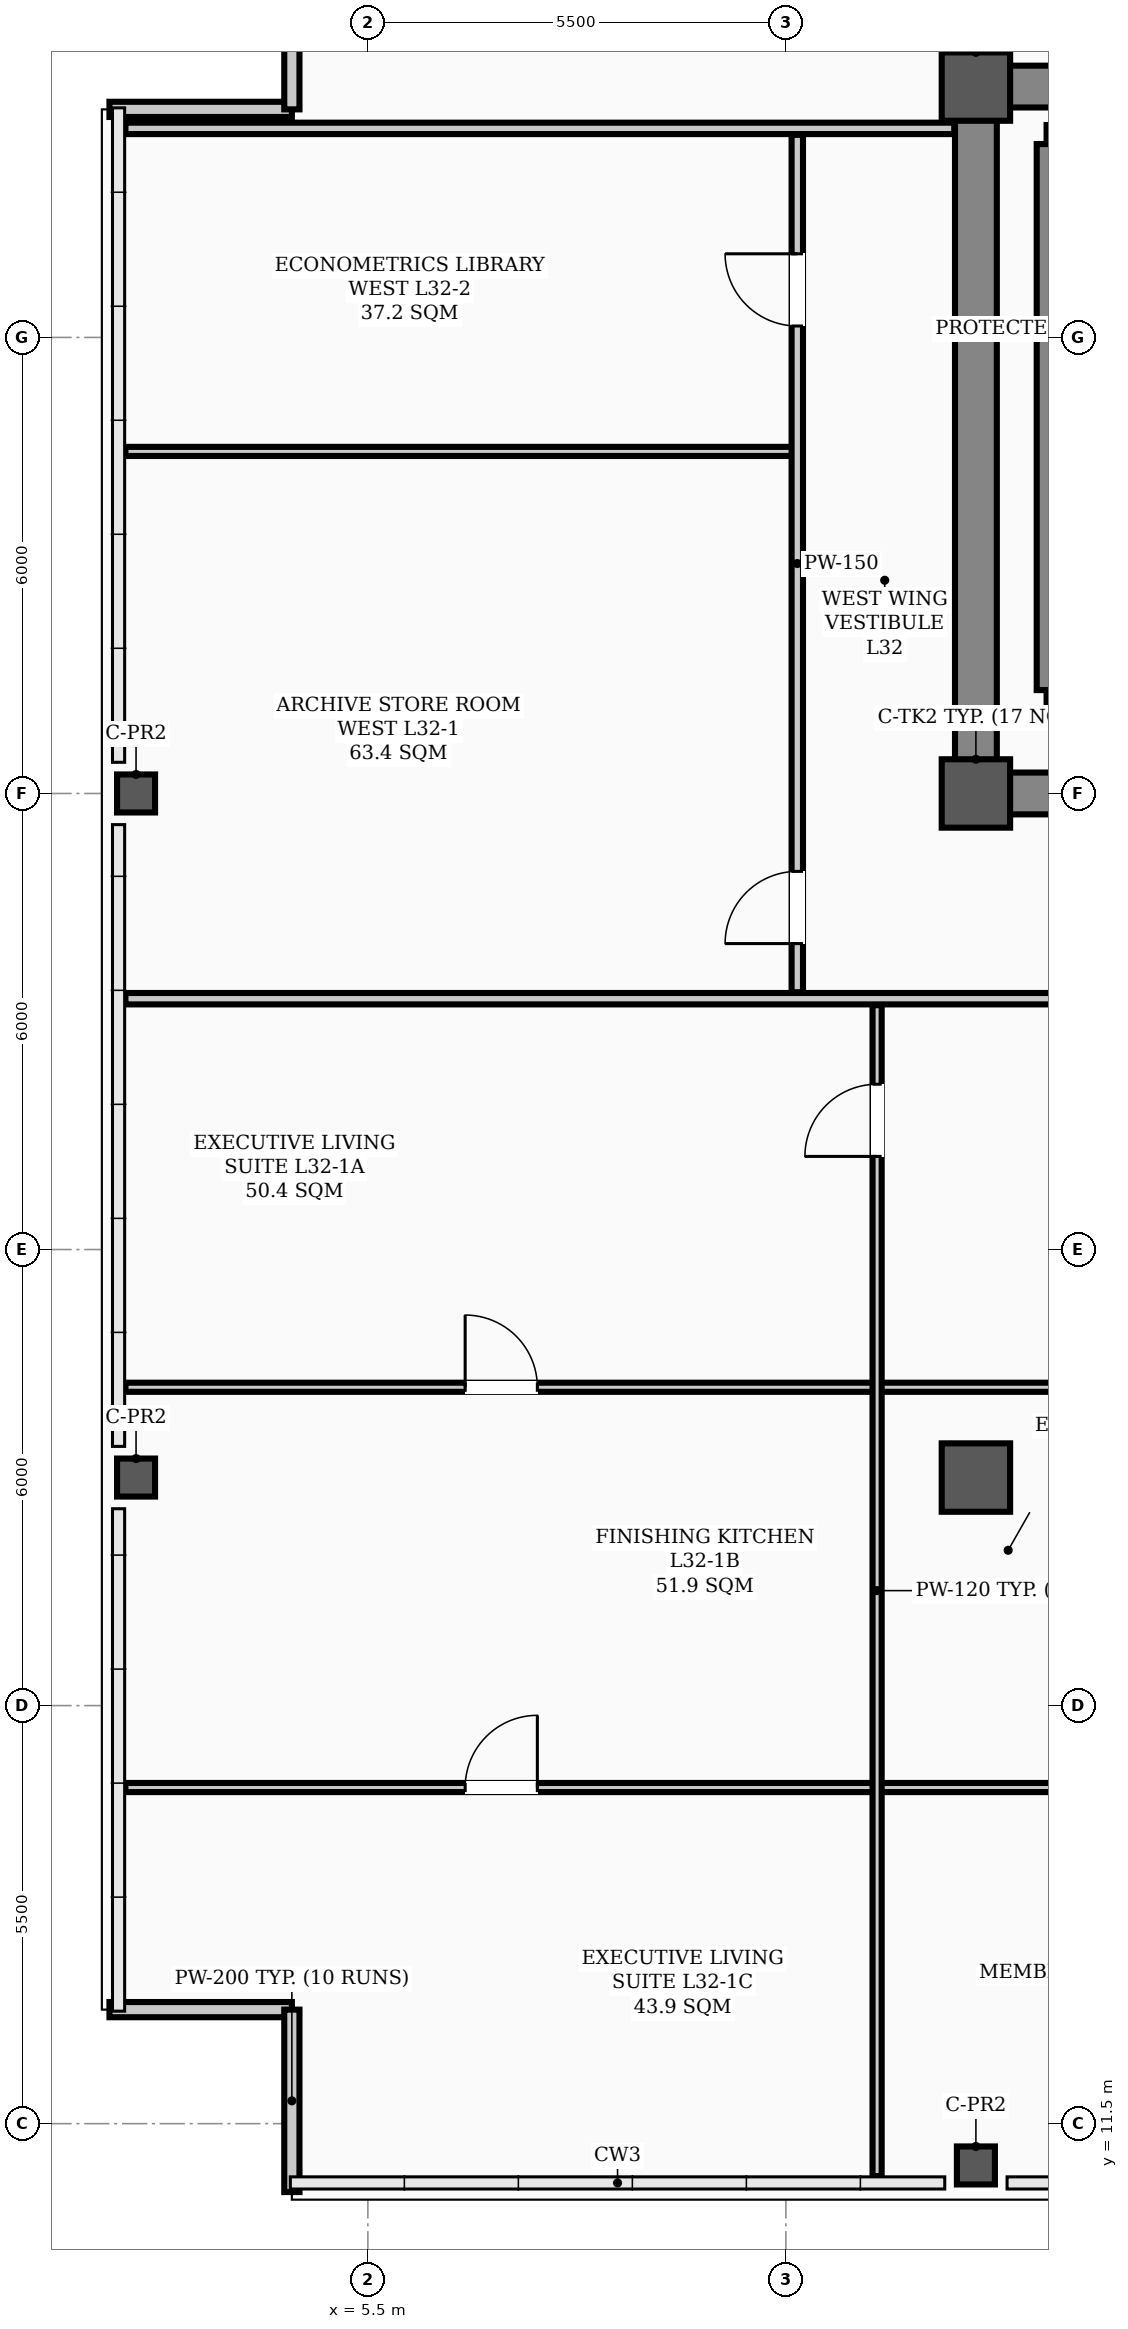
"""IFC4 building model, lengths in metres.
Left out: names, types, materials, properties, quantities, classifications, styles, units other than length and angle.
Written with IfcOpenShell. Run it as: python <this file> out.ifc"""

import sys

from ifc_helpers import new_model, si_unit, direction, frame, frame_2d, origin, origin_2d, place, context, subcontext, project, spatial, rectangle, hollow_rectangle, extrude, element, fill, save


model = new_model("IFC4")
c1 = context("Model", 3, precision=1e-05, world=origin(), true_north=direction((0.0, 1.0)))
c2 = subcontext(c1, "Body", "Model", "MODEL_VIEW")
j1 = project(units=[si_unit("LENGTHUNIT", "METRE"), si_unit("PLANEANGLEUNIT", "RADIAN")], contexts=[c1])
p1 = place(None, origin())
s1 = spatial("IfcSite", under=j1, at=p1, CompositionType="ELEMENT")
p2 = place(p1, origin())
s2 = spatial("IfcBuilding", under=s1, at=p2, CompositionType="ELEMENT")
p3 = place(p2, frame((0.0, 0.0, 130.5)))
s3 = spatial("IfcBuildingStorey", under=s2, at=p3, CompositionType="ELEMENT", Elevation=130.5)
for number, where, z_axis, x_axis in (
    (1, (13.5, 29.0, 0.0), (0.0, 0.0, 1.0), (1.0, 0.0, 0.0)),
    (2, (13.5, 38.3, 0.0), (0.0, 0.0, 1.0), (1.0, 0.0, 0.0)),
    (3, (13.5, 20.0, 0.0), (0.0, 0.0, 1.0), (1.0, 0.0, 0.0)),
):
    element("IfcColumn", number, at=place(p3, frame(where, z_axis=z_axis, x_axis=x_axis)), inside=s3, PredefinedType="COLUMN", context=c2, shape_type="SweptSolid", body=[
        extrude(hollow_rectangle(XDim=0.9, YDim=0.9, WallThickness=0.035, InnerFilletRadius=0.017, OuterFilletRadius=0.052, at=origin_2d()), origin(), (0.0, 0.0, 1.0), 3.9),
    ])
for number, where, z_axis, x_axis in (
    (4, (2.45, 20.0, 0.0), (0.0, 0.0, 1.0), (1.0, 0.0, 0.0)),
    (5, (2.45, 29.0, 0.0), (0.0, 0.0, 1.0), (1.0, 0.0, 0.0)),
    (6, (13.5, 10.95, 0.0), (0.0, 0.0, 1.0), (1.0, 0.0, 0.0)),
):
    element("IfcColumn", number, at=place(p3, frame(where, z_axis=z_axis, x_axis=x_axis)), inside=s3, PredefinedType="COLUMN", context=c2, shape_type="SweptSolid", body=[
        extrude(hollow_rectangle(XDim=0.5, YDim=0.5, WallThickness=0.024, InnerFilletRadius=0.012, OuterFilletRadius=0.036, at=origin_2d()), origin(), (0.0, 0.0, 1.0), 3.9),
    ])
for number, where, z_axis, x_axis in (
    (7, (2.1, 13.0, 0.0), (0.0, 0.0, 1.0), (1.0, 0.0, 0.0)),
    (8, (4.5, 13.0, 0.0), (0.0, 0.0, 1.0), (0.0, -1.0, 0.0)),
    (9, (2.1, 38.0, 0.0), (0.0, 0.0, 1.0), (1.0, 0.0, 0.0)),
    (10, (4.5, 38.0, 0.0), (0.0, 0.0, 1.0), (0.0, 1.0, 0.0)),
):
    element("IfcWall", number, at=place(p3, frame(where, z_axis=z_axis, x_axis=x_axis)), inside=s3, PredefinedType="PARAPET", context=c2, shape_type="SweptSolid", body=[
        extrude(rectangle(XDim=2.4, YDim=0.2, at=frame_2d((1.2, 0.0))), origin(), (0.0, 0.0, 1.0), 1.2),
    ])
p4 = place(p3, frame((13.5, 29.0, 0.0), z_axis=(0.0, 0.0, 1.0), x_axis=(1.0, 0.0, 0.0)))
e11 = element("IfcWall", 11, at=p4, inside=s3, PredefinedType="SHEAR", context=c2, shape_type="SweptSolid", body=[
    extrude(rectangle(XDim=30.5, YDim=0.55, at=frame_2d((15.25, 0.0))), origin(), (0.0, 0.0, 1.0), 3.72),
])
p5 = place(p4, frame((1.75, 0.0, 0.0)))
e12 = element("IfcOpeningElement", 12, at=p5, cuts=e11, PredefinedType="OPENING", context=c2, shape_type="SweptSolid", body=[
    extrude(rectangle(XDim=1.1, YDim=2.08, at=frame_2d((0.55, 1.04))), frame((0.0, 0.285, 0.0), z_axis=(0.0, -1.0, 0.0), x_axis=(1.0, 0.0, 0.0)), (0.0, 0.0, 1.0), 0.57),
])
p6 = place(p4, frame((26.7, 0.0, 0.0)))
e13 = element("IfcOpeningElement", 13, at=p6, cuts=e11, PredefinedType="OPENING", context=c2, shape_type="SweptSolid", body=[
    extrude(rectangle(XDim=1.1, YDim=2.08, at=frame_2d((0.55, 1.04))), frame((0.0, 0.285, 0.0), z_axis=(0.0, -1.0, 0.0), x_axis=(1.0, 0.0, 0.0)), (0.0, 0.0, 1.0), 0.57),
])
p7 = place(p4, frame((6.8, 0.0, 0.0)))
e14 = element("IfcOpeningElement", 14, at=p7, cuts=e11, PredefinedType="OPENING", context=c2, shape_type="SweptSolid", body=[
    extrude(rectangle(XDim=1.1, YDim=2.08, at=frame_2d((0.55, 1.04))), frame((0.0, 0.285, 0.0), z_axis=(0.0, -1.0, 0.0), x_axis=(1.0, 0.0, 0.0)), (0.0, 0.0, 1.0), 0.57),
])
p8 = place(p4, frame((13.2, 0.0, 0.0)))
e15 = element("IfcOpeningElement", 15, at=p8, cuts=e11, PredefinedType="OPENING", context=c2, shape_type="SweptSolid", body=[
    extrude(rectangle(XDim=1.6, YDim=2.08, at=frame_2d((0.8, 1.04))), frame((0.0, 0.285, 0.0), z_axis=(0.0, -1.0, 0.0), x_axis=(1.0, 0.0, 0.0)), (0.0, 0.0, 1.0), 0.57),
])
p9 = place(p4, frame((19.53, 0.0, 0.0)))
e16 = element("IfcOpeningElement", 16, at=p9, cuts=e11, PredefinedType="OPENING", context=c2, shape_type="SweptSolid", body=[
    extrude(rectangle(XDim=0.9, YDim=2.08, at=frame_2d((0.45, 1.04))), frame((0.0, 0.285, 0.0), z_axis=(0.0, -1.0, 0.0), x_axis=(1.0, 0.0, 0.0)), (0.0, 0.0, 1.0), 0.57),
])
p10 = place(p4, frame((21.57, 0.0, 0.0)))
e17 = element("IfcOpeningElement", 17, at=p10, cuts=e11, PredefinedType="OPENING", context=c2, shape_type="SweptSolid", body=[
    extrude(rectangle(XDim=0.9, YDim=2.08, at=frame_2d((0.45, 1.04))), frame((0.0, 0.285, 0.0), z_axis=(0.0, -1.0, 0.0), x_axis=(1.0, 0.0, 0.0)), (0.0, 0.0, 1.0), 0.57),
])
p11 = place(p3, frame((13.5, 38.3, 0.0), z_axis=(0.0, 0.0, 1.0), x_axis=(1.0, 0.0, 0.0)))
e18 = element("IfcWall", 18, at=p11, inside=s3, PredefinedType="SHEAR", context=c2, shape_type="SweptSolid", body=[
    extrude(rectangle(XDim=30.5, YDim=0.55, at=frame_2d((15.25, 0.0))), origin(), (0.0, 0.0, 1.0), 3.72),
])
p12 = place(p3, frame((13.5, 29.35, 0.0), z_axis=(0.0, 0.0, 1.0), x_axis=(0.0, 1.0, 0.0)))
e19 = element("IfcWall", 19, at=p12, inside=s3, PredefinedType="SHEAR", context=c2, shape_type="SweptSolid", body=[
    extrude(rectangle(XDim=8.6, YDim=0.55, at=frame_2d((4.3, 0.0))), origin(), (0.0, 0.0, 1.0), 3.72),
])
p13 = place(p3, frame((14.43, 30.235, 0.0), z_axis=(0.0, 0.0, 1.0), x_axis=(1.0, 0.0, 0.0)))
e20 = element("IfcWall", 20, at=p13, inside=s3, PredefinedType="STANDARD", context=c2, shape_type="SweptSolid", body=[
    extrude(rectangle(XDim=3.34, YDim=0.25, at=frame_2d((1.67, 0.0))), origin(), (0.0, 0.0, 1.0), 3.72),
])
p14 = place(p13, frame((1.1, 0.0, 0.0)))
e21 = element("IfcOpeningElement", 21, at=p14, cuts=e20, PredefinedType="OPENING", context=c2, shape_type="SweptSolid", body=[
    extrude(rectangle(XDim=1.1, YDim=2.08, at=frame_2d((0.55, 1.04))), frame((0.0, 0.135, 0.0), z_axis=(0.0, -1.0, 0.0), x_axis=(1.0, 0.0, 0.0)), (0.0, 0.0, 1.0), 0.27),
])
p15 = place(p3, frame((14.43, 37.669, 0.0), z_axis=(0.0, 0.0, 1.0), x_axis=(1.0, 0.0, 0.0)))
e22 = element("IfcWall", 22, at=p15, inside=s3, PredefinedType="STANDARD", context=c2, shape_type="SweptSolid", body=[
    extrude(rectangle(XDim=3.34, YDim=0.25, at=frame_2d((1.67, 0.0))), origin(), (0.0, 0.0, 1.0), 3.72),
])
p16 = place(p3, frame((14.425, 30.36, 0.0), z_axis=(0.0, 0.0, 1.0), x_axis=(0.0, 1.0, 0.0)))
e23 = element("IfcWall", 23, at=p16, inside=s3, PredefinedType="STANDARD", context=c2, shape_type="SweptSolid", body=[
    extrude(rectangle(XDim=7.184, YDim=0.25, at=frame_2d((3.592, 0.0))), origin(), (0.0, 0.0, 1.0), 3.72),
])
p17 = place(p3, frame((2.31, 26.3, 0.0), z_axis=(0.0, 0.0, 1.0), x_axis=(1.0, 0.0, 0.0)))
e24 = element("IfcWall", 24, at=p17, inside=s3, PredefinedType="PARTITIONING", context=c2, shape_type="SweptSolid", body=[
    extrude(rectangle(XDim=46.38, YDim=0.15, at=frame_2d((23.19, 0.0))), origin(), (0.0, 0.0, 1.0), 3.1),
])
p18 = place(p17, frame((12.515, 0.0, 0.0)))
e25 = element("IfcOpeningElement", 25, at=p18, cuts=e24, PredefinedType="OPENING", context=c2, shape_type="SweptSolid", body=[
    extrude(rectangle(XDim=0.95, YDim=2.08, at=frame_2d((0.475, 1.04))), frame((0.0, 0.085, 0.0), z_axis=(0.0, -1.0, 0.0), x_axis=(1.0, 0.0, 0.0)), (0.0, 0.0, 1.0), 0.17),
])
p19 = place(p17, frame((18.615, 0.0, 0.0)))
e26 = element("IfcOpeningElement", 26, at=p19, cuts=e24, PredefinedType="OPENING", context=c2, shape_type="SweptSolid", body=[
    extrude(rectangle(XDim=0.95, YDim=2.08, at=frame_2d((0.475, 1.04))), frame((0.0, 0.085, 0.0), z_axis=(0.0, -1.0, 0.0), x_axis=(1.0, 0.0, 0.0)), (0.0, 0.0, 1.0), 0.17),
])
p20 = place(p17, frame((26.115, 0.0, 0.0)))
e27 = element("IfcOpeningElement", 27, at=p20, cuts=e24, PredefinedType="OPENING", context=c2, shape_type="SweptSolid", body=[
    extrude(rectangle(XDim=0.95, YDim=2.08, at=frame_2d((0.475, 1.04))), frame((0.0, 0.085, 0.0), z_axis=(0.0, -1.0, 0.0), x_axis=(1.0, 0.0, 0.0)), (0.0, 0.0, 1.0), 0.17),
])
p21 = place(p17, frame((31.665, 0.0, 0.0)))
e28 = element("IfcOpeningElement", 28, at=p21, cuts=e24, PredefinedType="OPENING", context=c2, shape_type="SweptSolid", body=[
    extrude(rectangle(XDim=0.95, YDim=2.08, at=frame_2d((0.475, 1.04))), frame((0.0, 0.085, 0.0), z_axis=(0.0, -1.0, 0.0), x_axis=(1.0, 0.0, 0.0)), (0.0, 0.0, 1.0), 0.17),
])
p22 = place(p17, frame((43.06, 0.0, 0.0)))
e29 = element("IfcOpeningElement", 29, at=p22, cuts=e24, PredefinedType="OPENING", context=c2, shape_type="SweptSolid", body=[
    extrude(rectangle(XDim=0.95, YDim=2.08, at=frame_2d((0.475, 1.04))), frame((0.0, 0.085, 0.0), z_axis=(0.0, -1.0, 0.0), x_axis=(1.0, 0.0, 0.0)), (0.0, 0.0, 1.0), 0.17),
])
p23 = place(p3, frame((2.31, 37.75, 0.0), z_axis=(0.0, 0.0, 1.0), x_axis=(1.0, 0.0, 0.0)))
e30 = element("IfcWall", 30, at=p23, inside=s3, PredefinedType="PARTITIONING", context=c2, shape_type="SweptSolid", body=[
    extrude(rectangle(XDim=10.905, YDim=0.15, at=frame_2d((5.453, 0.0))), origin(), (0.0, 0.0, 1.0), 3.1),
])
p24 = place(p3, frame((2.31, 21.188, 0.0), z_axis=(0.0, 0.0, 1.0), x_axis=(1.0, 0.0, 0.0)))
e31 = element("IfcWall", 31, at=p24, inside=s3, PredefinedType="PARTITIONING", context=c2, shape_type="SweptSolid", body=[
    extrude(rectangle(XDim=9.89, YDim=0.12, at=frame_2d((4.945, 0.0))), origin(), (0.0, 0.0, 1.0), 3.212),
])
p25 = place(p24, frame((4.47, 0.0, 0.0)))
e32 = element("IfcOpeningElement", 32, at=p25, cuts=e31, PredefinedType="OPENING", context=c2, shape_type="SweptSolid", body=[
    extrude(rectangle(XDim=0.95, YDim=2.08, at=frame_2d((0.475, 1.04))), frame((0.0, 0.07, 0.0), z_axis=(0.0, -1.0, 0.0), x_axis=(1.0, 0.0, 0.0)), (0.0, 0.0, 1.0), 0.14),
])
p26 = place(p3, frame((2.31, 15.922, 0.0), z_axis=(0.0, 0.0, 1.0), x_axis=(1.0, 0.0, 0.0)))
e33 = element("IfcWall", 33, at=p26, inside=s3, PredefinedType="PARTITIONING", context=c2, shape_type="SweptSolid", body=[
    extrude(rectangle(XDim=9.89, YDim=0.12, at=frame_2d((4.945, 0.0))), origin(), (0.0, 0.0, 1.0), 3.72),
])
p27 = place(p26, frame((4.47, 0.0, 0.0)))
e34 = element("IfcOpeningElement", 34, at=p27, cuts=e33, PredefinedType="OPENING", context=c2, shape_type="SweptSolid", body=[
    extrude(rectangle(XDim=0.95, YDim=2.08, at=frame_2d((0.475, 1.04))), frame((0.0, 0.07, 0.0), z_axis=(0.0, -1.0, 0.0), x_axis=(1.0, 0.0, 0.0)), (0.0, 0.0, 1.0), 0.14),
])
p28 = place(p3, frame((12.2, 21.188, 0.0), z_axis=(0.0, 0.0, 1.0), x_axis=(1.0, 0.0, 0.0)))
e35 = element("IfcWall", 35, at=p28, inside=s3, PredefinedType="PARTITIONING", context=c2, shape_type="SweptSolid", body=[
    extrude(rectangle(XDim=6.2, YDim=0.12, at=frame_2d((3.1, 0.0))), origin(), (0.0, 0.0, 1.0), 3.1),
])
p29 = place(p28, frame((2.625, 0.0, 0.0)))
e36 = element("IfcOpeningElement", 36, at=p29, cuts=e35, PredefinedType="OPENING", context=c2, shape_type="SweptSolid", body=[
    extrude(rectangle(XDim=0.95, YDim=2.08, at=frame_2d((0.475, 1.04))), frame((0.0, 0.07, 0.0), z_axis=(0.0, -1.0, 0.0), x_axis=(1.0, 0.0, 0.0)), (0.0, 0.0, 1.0), 0.14),
])
p30 = place(p3, frame((12.2, 15.922, 0.0), z_axis=(0.0, 0.0, 1.0), x_axis=(1.0, 0.0, 0.0)))
e37 = element("IfcWall", 37, at=p30, inside=s3, PredefinedType="PARTITIONING", context=c2, shape_type="SweptSolid", body=[
    extrude(rectangle(XDim=6.2, YDim=0.12, at=frame_2d((3.1, 0.0))), origin(), (0.0, 0.0, 1.0), 3.1),
])
p31 = place(p30, frame((2.625, 0.0, 0.0)))
e38 = element("IfcOpeningElement", 38, at=p31, cuts=e37, PredefinedType="OPENING", context=c2, shape_type="SweptSolid", body=[
    extrude(rectangle(XDim=0.95, YDim=2.08, at=frame_2d((0.475, 1.04))), frame((0.0, 0.07, 0.0), z_axis=(0.0, -1.0, 0.0), x_axis=(1.0, 0.0, 0.0)), (0.0, 0.0, 1.0), 0.14),
])
p32 = place(p3, frame((2.31, 33.5, 0.0), z_axis=(0.0, 0.0, 1.0), x_axis=(1.0, 0.0, 0.0)))
e39 = element("IfcWall", 39, at=p32, inside=s3, PredefinedType="PARTITIONING", context=c2, shape_type="SweptSolid", body=[
    extrude(rectangle(XDim=8.84, YDim=0.12, at=frame_2d((4.42, 0.0))), origin(), (0.0, 0.0, 1.0), 3.72),
])
p33 = place(p3, frame((11.15, 26.385, 0.0), z_axis=(0.0, 0.0, 1.0), x_axis=(0.0, 1.0, 0.0)))
e40 = element("IfcWall", 40, at=p33, inside=s3, PredefinedType="PARTITIONING", context=c2, shape_type="SweptSolid", body=[
    extrude(rectangle(XDim=11.28, YDim=0.15, at=frame_2d((5.64, 0.0))), origin(), (0.0, 0.0, 1.0), 3.0),
])
p34 = place(p33, frame((0.64, 0.0, 0.0)))
e41 = element("IfcOpeningElement", 41, at=p34, cuts=e40, PredefinedType="OPENING", context=c2, shape_type="SweptSolid", body=[
    extrude(rectangle(XDim=0.95, YDim=2.08, at=frame_2d((0.475, 1.04))), frame((0.0, 0.085, 0.0), z_axis=(0.0, -1.0, 0.0), x_axis=(1.0, 0.0, 0.0)), (0.0, 0.0, 1.0), 0.17),
])
p35 = place(p33, frame((8.765, 0.0, 0.0)))
e42 = element("IfcOpeningElement", 42, at=p35, cuts=e40, PredefinedType="OPENING", context=c2, shape_type="SweptSolid", body=[
    extrude(rectangle(XDim=0.95, YDim=2.08, at=frame_2d((0.475, 1.04))), frame((0.0, 0.085, 0.0), z_axis=(0.0, -1.0, 0.0), x_axis=(1.0, 0.0, 0.0)), (0.0, 0.0, 1.0), 0.17),
])
p36 = place(p3, frame((12.2, 10.81, 0.0), z_axis=(0.0, 0.0, 1.0), x_axis=(0.0, 1.0, 0.0)))
e43 = element("IfcWall", 43, at=p36, inside=s3, PredefinedType="PARTITIONING", context=c2, shape_type="SweptSolid", body=[
    extrude(rectangle(XDim=15.405, YDim=0.12, at=frame_2d((7.703, 0.0))), origin(), (0.0, 0.0, 1.0), 3.0),
])
p37 = place(p36, frame((13.415, 0.0, 0.0)))
e44 = element("IfcOpeningElement", 44, at=p37, cuts=e43, PredefinedType="OPENING", context=c2, shape_type="SweptSolid", body=[
    extrude(rectangle(XDim=0.95, YDim=2.08, at=frame_2d((0.475, 1.04))), frame((0.0, 0.07, 0.0), z_axis=(0.0, -1.0, 0.0), x_axis=(1.0, 0.0, 0.0)), (0.0, 0.0, 1.0), 0.14),
])
p38 = place(p25, origin())
e45 = element("IfcDoor", 45, at=p38, inside=s3, OperationType="SINGLE_SWING_LEFT", PredefinedType="DOOR", context=c2, shape_type="SweptSolid", body=[
    extrude(rectangle(XDim=0.95, YDim=2.08, at=frame_2d((0.475, 1.04))), frame((0.0, 0.025, 0.0), z_axis=(0.0, -1.0, 0.0), x_axis=(1.0, 0.0, 0.0)), (0.0, 0.0, 1.0), 0.05),
])
fill(e32, e45)
p39 = place(p27, origin())
e46 = element("IfcDoor", 46, at=p39, inside=s3, OperationType="SINGLE_SWING_RIGHT", PredefinedType="DOOR", context=c2, shape_type="SweptSolid", body=[
    extrude(rectangle(XDim=0.95, YDim=2.08, at=frame_2d((0.475, 1.04))), frame((0.0, 0.025, 0.0), z_axis=(0.0, -1.0, 0.0), x_axis=(1.0, 0.0, 0.0)), (0.0, 0.0, 1.0), 0.05),
])
fill(e34, e46)
p40 = place(p37, origin())
e47 = element("IfcDoor", 47, at=p40, inside=s3, OperationType="SINGLE_SWING_LEFT", PredefinedType="DOOR", context=c2, shape_type="SweptSolid", body=[
    extrude(rectangle(XDim=0.95, YDim=2.08, at=frame_2d((0.475, 1.04))), frame((0.0, 0.025, 0.0), z_axis=(0.0, -1.0, 0.0), x_axis=(1.0, 0.0, 0.0)), (0.0, 0.0, 1.0), 0.05),
])
fill(e44, e47)
p41 = place(p34, origin())
e48 = element("IfcDoor", 48, at=p41, inside=s3, OperationType="SINGLE_SWING_LEFT", PredefinedType="DOOR", context=c2, shape_type="SweptSolid", body=[
    extrude(rectangle(XDim=0.95, YDim=2.08, at=frame_2d((0.475, 1.04))), frame((0.0, 0.025, 0.0), z_axis=(0.0, -1.0, 0.0), x_axis=(1.0, 0.0, 0.0)), (0.0, 0.0, 1.0), 0.05),
])
fill(e41, e48)
p42 = place(p35, origin())
e49 = element("IfcDoor", 49, at=p42, inside=s3, OperationType="SINGLE_SWING_RIGHT", PredefinedType="DOOR", context=c2, shape_type="SweptSolid", body=[
    extrude(rectangle(XDim=0.95, YDim=2.08, at=frame_2d((0.475, 1.04))), frame((0.0, 0.025, 0.0), z_axis=(0.0, -1.0, 0.0), x_axis=(1.0, 0.0, 0.0)), (0.0, 0.0, 1.0), 0.05),
])
fill(e42, e49)
save(model, sys.argv[1])
